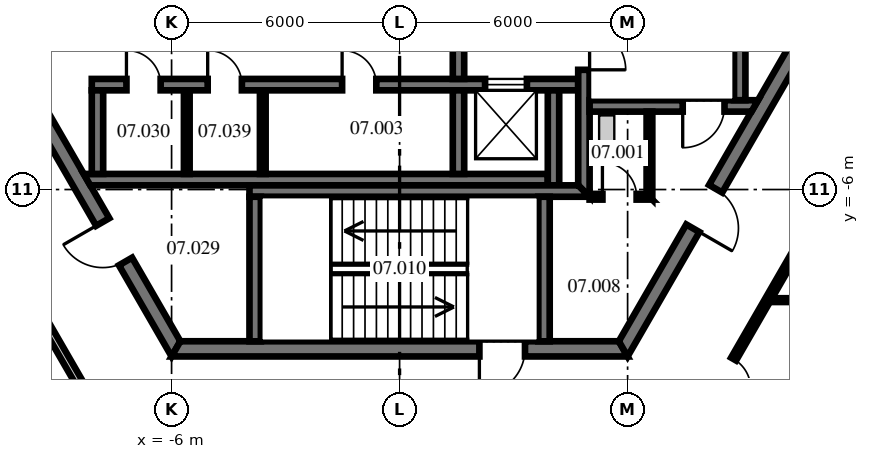
"""IFC4 building model, lengths in metres.
Left out: names, types, materials, properties, quantities, classifications, styles, units other than length and angle.
Written with IfcOpenShell. Run it as: python <this file> out.ifc"""

import sys

from ifc_helpers import new_model, si_unit, direction, frame, frame_2d, origin, place, context, subcontext, project, spatial, polyline, rectangle, outline, extrude, source, transform, mapped, element, fill, save


model = new_model("IFC4")
c1 = context("Model", 3, precision=1e-05, world=origin(), true_north=direction((0.0, 1.0)))
c2 = subcontext(c1, "Body", "Model", "MODEL_VIEW")
j1 = project(units=[si_unit("LENGTHUNIT", "METRE"), si_unit("PLANEANGLEUNIT", "RADIAN")], contexts=[c1])
p1 = place(None, origin())
s1 = spatial("IfcSite", under=j1, at=p1, CompositionType="ELEMENT")
p2 = place(p1, origin())
s2 = spatial("IfcBuilding", under=s1, at=p2, CompositionType="ELEMENT")
p3 = place(p2, frame((0.0, 0.0, 33.2)))
s3 = spatial("IfcBuildingStorey", under=s2, at=p3, CompositionType="ELEMENT", Elevation=33.2)
m1 = source(origin(), c2, "Body", "SweptSolid", [
    extrude(outline(polyline([(-0.115, -0.2), (11.885, -0.2), (11.654, 0.2), (0.115, 0.2), (-0.115, -0.2)])), origin(), (0.0, 0.0, 1.0), 4.1),
])
p4 = place(p3, frame((-11.769, 0.0, 0.0), z_axis=(0.0, 0.0, 1.0), x_axis=(0.499996592174, -0.866027371285, 0.0)))
e1 = element("IfcWall", 1, at=p4, inside=s3, PredefinedType="SHEAR", context=c2, shape_type="MappedRepresentation", body=[
    mapped(m1, transform((0.0, 0.0, 0.0), scale=1.0)),
])
p5 = place(p4, frame((1.405, 0.0, 0.0)))
e2 = element("IfcOpeningElement", 2, at=p5, cuts=e1, PredefinedType="OPENING", context=c2, shape_type="SweptSolid", body=[
    extrude(rectangle(XDim=1.8, YDim=2.1, at=frame_2d((0.9, 1.05))), frame((0.0, 0.21, 0.0), z_axis=(0.0, -1.0, 0.0), x_axis=(1.0, 0.0, 0.0)), (0.0, 0.0, 1.0), 0.42),
])
p6 = place(p4, frame((7.915, 0.0, 0.0)))
e3 = element("IfcOpeningElement", 3, at=p6, cuts=e1, PredefinedType="OPENING", context=c2, shape_type="SweptSolid", body=[
    extrude(rectangle(XDim=1.2, YDim=2.1, at=frame_2d((0.6, 1.05))), frame((0.0, 0.21, 0.0), z_axis=(0.0, -1.0, 0.0), x_axis=(1.0, 0.0, 0.0)), (0.0, 0.0, 1.0), 0.42),
])
p7 = place(p3, frame((-5.885, -10.192, 0.0), z_axis=(0.0, 0.0, 1.0), x_axis=(1.0, 0.0, 0.0)))
e4 = element("IfcWall", 4, at=p7, inside=s3, PredefinedType="SHEAR", context=c2, shape_type="MappedRepresentation", body=[
    mapped(m1, transform((0.0, 0.0, 0.0), scale=1.0)),
])
p8 = place(p7, frame((7.985, 0.0, 0.0)))
e5 = element("IfcOpeningElement", 5, at=p8, cuts=e4, PredefinedType="OPENING", context=c2, shape_type="SweptSolid", body=[
    extrude(rectangle(XDim=1.2, YDim=2.1, at=frame_2d((0.6, 1.05))), frame((0.0, 0.21, 0.0), z_axis=(0.0, -1.0, 0.0), x_axis=(1.0, 0.0, 0.0)), (0.0, 0.0, 1.0), 0.42),
])
p9 = place(p3, frame((5.885, -10.192, 0.0), z_axis=(0.0, 0.0, 1.0), x_axis=(0.499996592174, 0.866027371285, 0.0)))
e6 = element("IfcWall", 6, at=p9, inside=s3, PredefinedType="SHEAR", context=c2, shape_type="MappedRepresentation", body=[
    mapped(m1, transform((0.0, 0.0, 0.0), scale=1.0)),
])
p10 = place(p9, frame((3.665, 0.0, 0.0)))
e7 = element("IfcOpeningElement", 7, at=p10, cuts=e6, PredefinedType="OPENING", context=c2, shape_type="SweptSolid", body=[
    extrude(rectangle(XDim=1.2, YDim=2.1, at=frame_2d((0.6, 1.05))), frame((0.0, 0.21, 0.0), z_axis=(0.0, -1.0, 0.0), x_axis=(1.0, 0.0, 0.0)), (0.0, 0.0, 1.0), 0.42),
])
m2 = source(origin(), c2, "Body", "SweptSolid", [
    extrude(rectangle(XDim=12.8, YDim=0.3, at=frame_2d((6.4, 0.0))), origin(), (0.0, 0.0, 1.0), 4.1),
])
p11 = place(p3, frame((-8.1, -3.24, 0.0), z_axis=(0.0, 0.0, 1.0), x_axis=(1.0, 0.0, 0.0)))
e8 = element("IfcWall", 8, at=p11, inside=s3, PredefinedType="SHEAR", context=c2, shape_type="MappedRepresentation", body=[
    mapped(m2, transform((0.0, 0.0, 0.0), scale=1.0)),
])
p12 = place(p11, frame((0.913, 0.0, 0.0)))
e9 = element("IfcOpeningElement", 9, at=p12, cuts=e8, PredefinedType="OPENING", context=c2, shape_type="SweptSolid", body=[
    extrude(rectangle(XDim=0.9, YDim=2.1, at=frame_2d((0.45, 1.05))), frame((0.0, 0.16, 0.0), z_axis=(0.0, -1.0, 0.0), x_axis=(1.0, 0.0, 0.0)), (0.0, 0.0, 1.0), 0.32),
])
p13 = place(p11, frame((3.05, 0.0, 0.0)))
e10 = element("IfcOpeningElement", 10, at=p13, cuts=e8, PredefinedType="OPENING", context=c2, shape_type="SweptSolid", body=[
    extrude(rectangle(XDim=0.9, YDim=2.1, at=frame_2d((0.45, 1.05))), frame((0.0, 0.16, 0.0), z_axis=(0.0, -1.0, 0.0), x_axis=(1.0, 0.0, 0.0)), (0.0, 0.0, 1.0), 0.32),
])
p14 = place(p11, frame((6.587, 0.0, 0.0)))
e11 = element("IfcOpeningElement", 11, at=p14, cuts=e8, PredefinedType="OPENING", context=c2, shape_type="SweptSolid", body=[
    extrude(rectangle(XDim=0.9, YDim=2.1, at=frame_2d((0.45, 1.05))), frame((0.0, 0.16, 0.0), z_axis=(0.0, -1.0, 0.0), x_axis=(1.0, 0.0, 0.0)), (0.0, 0.0, 1.0), 0.32),
])
p15 = place(p11, frame((10.35, 0.0, 0.0)))
e12 = element("IfcOpeningElement", 12, at=p15, cuts=e8, PredefinedType="OPENING", context=c2, shape_type="SweptSolid", body=[
    extrude(rectangle(XDim=1.1, YDim=2.1, at=frame_2d((0.55, 1.05))), frame((0.0, 0.16, 0.0), z_axis=(0.0, -1.0, 0.0), x_axis=(1.0, 0.0, 0.0)), (0.0, 0.0, 1.0), 0.32),
])
m3 = source(origin(), c2, "Body", "SweptSolid", [
    extrude(outline(polyline([(12.0, -0.15), (-0.04, -0.15), (-0.213, 0.15), (12.0, 0.15), (12.0, -0.15)])), origin(), (0.0, 0.0, 1.0), 4.1),
])
p16 = place(p3, frame((-8.1, -5.74, 0.0), z_axis=(0.0, 0.0, 1.0), x_axis=(1.0, 0.0, 0.0)))
e13 = element("IfcWall", 13, at=p16, inside=s3, PredefinedType="SHEAR", context=c2, shape_type="MappedRepresentation", body=[
    mapped(m3, transform((0.0, 0.0, 0.0), scale=1.0)),
])
m4 = source(origin(), c2, "Body", "SweptSolid", [
    extrude(rectangle(XDim=2.2, YDim=0.3, at=frame_2d((1.1, 0.0))), origin(), (0.0, 0.0, 1.0), 4.1),
])
for number, where, z_axis, x_axis in (
    (14, (-7.95, -5.59, 0.0), (0.0, 0.0, 1.0), (0.0, 1.0, 0.0)),
    (15, (1.55, -5.59, 0.0), (0.0, 0.0, 1.0), (0.0, 1.0, 0.0)),
):
    element("IfcWall", number, at=place(p3, frame(where, z_axis=z_axis, x_axis=x_axis)), inside=s3, PredefinedType="SHEAR", context=c2, shape_type="MappedRepresentation", body=[
        mapped(m4, transform((0.0, 0.0, 0.0), scale=1.0)),
    ])
m5 = source(origin(), c2, "Body", "SweptSolid", [
    extrude(rectangle(XDim=2.5, YDim=0.3, at=frame_2d((1.25, 0.0))), origin(), (0.0, 0.0, 1.0), 4.1),
])
p17 = place(p3, frame((4.05, -5.89, 0.0), z_axis=(0.0, 0.0, 1.0), x_axis=(0.0, 1.0, 0.0)))
e16 = element("IfcWall", 16, at=p17, inside=s3, PredefinedType="SHEAR", context=c2, shape_type="MappedRepresentation", body=[
    mapped(m5, transform((0.0, 0.0, 0.0), scale=1.0)),
])
m6 = source(origin(), c2, "Body", "SweptSolid", [
    extrude(rectangle(XDim=3.0, YDim=0.3, at=frame_2d((1.5, 0.0))), origin(), (0.0, 0.0, 1.0), 4.1),
])
p18 = place(p3, frame((1.55, -3.09, 0.0), z_axis=(0.0, 0.0, 1.0), x_axis=(0.0, 1.0, 0.0)))
e17 = element("IfcWall", 17, at=p18, inside=s3, PredefinedType="SHEAR", context=c2, shape_type="MappedRepresentation", body=[
    mapped(m6, transform((0.0, 0.0, 0.0), scale=1.0)),
])
p19 = place(p18, frame((0.9, 0.0, 0.0)))
e18 = element("IfcOpeningElement", 18, at=p19, cuts=e17, PredefinedType="OPENING", context=c2, shape_type="SweptSolid", body=[
    extrude(rectangle(XDim=1.2, YDim=2.1, at=frame_2d((0.6, 1.05))), frame((0.0, 0.16, 0.0), z_axis=(0.0, -1.0, 0.0), x_axis=(1.0, 0.0, 0.0)), (0.0, 0.0, 1.0), 0.32),
])
m7 = source(origin(), c2, "Body", "SweptSolid", [
    extrude(outline(polyline([(-0.15, -0.15), (9.99, -0.15), (9.99, 0.15), (0.15, 0.15), (-0.15, -0.15)])), origin(), (0.0, 0.0, 1.0), 4.1),
])
p20 = place(p3, frame((4.85, -6.04, 0.0), z_axis=(0.0, 0.0, 1.0), x_axis=(0.0, 1.0, 0.0)))
e19 = element("IfcWall", 19, at=p20, inside=s3, PredefinedType="SHEAR", context=c2, shape_type="MappedRepresentation", body=[
    mapped(m7, transform((0.0, 0.0, 0.0), scale=1.0)),
])
p21 = place(p20, frame((3.19, 0.0, 0.0)))
e20 = element("IfcOpeningElement", 20, at=p21, cuts=e19, PredefinedType="OPENING", context=c2, shape_type="SweptSolid", body=[
    extrude(rectangle(XDim=1.1, YDim=2.1, at=frame_2d((0.55, 1.05))), frame((0.0, 0.16, 0.0), z_axis=(0.0, -1.0, 0.0), x_axis=(1.0, 0.0, 0.0)), (0.0, 0.0, 1.0), 0.32),
])
m8 = source(origin(), c2, "Body", "SweptSolid", [
    extrude(outline(polyline([(0.0, -0.15), (0.0, 0.15), (4.433, 0.15), (4.26, -0.15), (0.0, -0.15)])), origin(), (0.0, 0.0, 1.0), 4.1),
])
p22 = place(p3, frame((5.0, -3.8, 0.0), z_axis=(0.0, 0.0, 1.0), x_axis=(1.0, 0.0, 0.0)))
e21 = element("IfcWall", 21, at=p22, inside=s3, PredefinedType="SHEAR", context=c2, shape_type="MappedRepresentation", body=[
    mapped(m8, transform((0.0, 0.0, 0.0), scale=1.0)),
])
p23 = place(p22, frame((2.45, 0.0, 0.0)))
e22 = element("IfcOpeningElement", 22, at=p23, cuts=e21, PredefinedType="OPENING", context=c2, shape_type="SweptSolid", body=[
    extrude(rectangle(XDim=1.1, YDim=2.1, at=frame_2d((0.55, 1.05))), frame((0.0, 0.16, 0.0), z_axis=(0.0, -1.0, 0.0), x_axis=(1.0, 0.0, 0.0)), (0.0, 0.0, 1.0), 0.32),
])
m9 = source(origin(), c2, "Body", "SweptSolid", [
    extrude(rectangle(XDim=7.3, YDim=0.3, at=frame_2d((3.65, 0.0))), origin(), (0.0, 0.0, 1.0), 4.1),
])
p24 = place(p3, frame((8.95, -3.65, 0.0), z_axis=(0.0, 0.0, 1.0), x_axis=(0.0, 1.0, 0.0)))
e23 = element("IfcWall", 23, at=p24, inside=s3, PredefinedType="SHEAR", context=c2, shape_type="MappedRepresentation", body=[
    mapped(m9, transform((0.0, 0.0, 0.0), scale=1.0)),
])
m10 = source(origin(), c2, "Body", "SweptSolid", [
    extrude(outline(polyline([(0.0, -0.15), (8.95, -0.15), (8.65, 0.15), (0.0, 0.15), (0.0, -0.15)])), origin(), (0.0, 0.0, 1.0), 4.1),
])
p25 = place(p3, frame((-3.95, -6.04, 0.0), z_axis=(0.0, 0.0, 1.0), x_axis=(1.0, 0.0, 0.0)))
e24 = element("IfcWall", 24, at=p25, inside=s3, PredefinedType="SHEAR", context=c2, shape_type="MappedRepresentation", body=[
    mapped(m10, transform((0.0, 0.0, 0.0), scale=1.0)),
])
m11 = source(origin(), c2, "Body", "SweptSolid", [
    extrude(outline(polyline([(3.8, -0.15), (-0.004, -0.15), (-0.004, 0.15), (3.8, 0.15), (3.8, -0.15)])), origin(), (0.0, 0.0, 1.0), 4.1),
])
for number, where, z_axis, x_axis in (
    (25, (-3.8, -9.99, 0.0), (0.0, 0.0, 1.0), (0.0, 1.0, 0.0)),
    (26, (3.8, -9.99, 0.0), (0.0, 0.0, 1.0), (0.0, 1.0, 0.0)),
):
    element("IfcWall", number, at=place(p3, frame(where, z_axis=z_axis, x_axis=x_axis)), inside=s3, PredefinedType="SHEAR", context=c2, shape_type="MappedRepresentation", body=[
        mapped(m11, transform((0.0, 0.0, 0.0), scale=1.0)),
    ])
m12 = source(origin(), c2, "Body", "SweptSolid", [
    extrude(outline(polyline([(0.0, -0.075), (1.65, -0.075), (1.5, 0.075), (0.0, 0.075), (0.0, -0.075)])), origin(), (0.0, 0.0, 1.0), 4.1),
])
p26 = place(p3, frame((5.0, -6.19, 0.0), z_axis=(0.0, 0.0, 1.0), x_axis=(1.0, 0.0, 0.0)))
e27 = element("IfcWall", 27, at=p26, inside=s3, PredefinedType="PARTITIONING", context=c2, shape_type="MappedRepresentation", body=[
    mapped(m12, transform((0.0, 0.0, 0.0), scale=1.0)),
])
p27 = place(p26, frame((0.337, 0.0, 0.0)))
e28 = element("IfcOpeningElement", 28, at=p27, cuts=e27, PredefinedType="OPENING", context=c2, shape_type="SweptSolid", body=[
    extrude(rectangle(XDim=0.9, YDim=2.1, at=frame_2d((0.45, 1.05))), frame((0.0, 0.085, 0.0), z_axis=(0.0, -1.0, 0.0), x_axis=(1.0, 0.0, 0.0)), (0.0, 0.0, 1.0), 0.17),
])
m13 = source(origin(), c2, "Body", "SweptSolid", [
    extrude(outline(polyline([(-0.075, -0.075), (2.24, -0.075), (2.24, 0.075), (0.075, 0.075), (-0.075, -0.075)])), origin(), (0.0, 0.0, 1.0), 4.1),
])
p28 = place(p3, frame((6.575, -6.19, 0.0), z_axis=(0.0, 0.0, 1.0), x_axis=(0.0, 1.0, 0.0)))
e29 = element("IfcWall", 29, at=p28, inside=s3, PredefinedType="PARTITIONING", context=c2, shape_type="MappedRepresentation", body=[
    mapped(m13, transform((0.0, 0.0, 0.0), scale=1.0)),
])
m14 = source(origin(), c2, "Body", "SweptSolid", [
    extrude(rectangle(XDim=2.2, YDim=0.15, at=frame_2d((1.1, 0.0))), origin(), (0.0, 0.0, 1.0), 4.1),
])
for number, where, z_axis, x_axis in (
    (30, (-5.6, -5.59, 0.0), (0.0, 0.0, 1.0), (0.0, 1.0, 0.0)),
    (31, (-3.6, -5.59, 0.0), (0.0, 0.0, 1.0), (0.0, 1.0, 0.0)),
):
    element("IfcWall", number, at=place(p3, frame(where, z_axis=z_axis, x_axis=x_axis)), inside=s3, PredefinedType="PARTITIONING", context=c2, shape_type="MappedRepresentation", body=[
        mapped(m14, transform((0.0, 0.0, 0.0), scale=1.0)),
    ])
m15 = source(origin(), c2, "Body", "SweptSolid", [
    extrude(rectangle(XDim=8.478, YDim=0.2, at=frame_2d((4.239, 0.0))), origin(), (0.0, 0.0, 1.0), 4.1),
])
p29 = place(p3, frame((-11.673, -5.466, 0.0), z_axis=(0.0, 0.0, 1.0), x_axis=(0.499985860718, -0.866033566949, 0.0)))
e32 = element("IfcWall", 32, at=p29, inside=s3, PredefinedType="PARTITIONING", context=c2, shape_type="MappedRepresentation", body=[
    mapped(m15, transform((0.0, 0.0, 0.0), scale=1.0)),
])
m16 = source(origin(), c2, "Body", "SweptSolid", [
    extrude(rectangle(XDim=11.802, YDim=0.1, at=frame_2d((5.901, 0.0))), origin(), (0.0, 0.0, 1.0), 3.343),
])
p30 = place(p3, frame((9.685, -8.91, 0.0), z_axis=(0.0, 0.0, 1.0), x_axis=(1.0, 0.0, 0.0)))
e33 = element("IfcWall", 33, at=p30, inside=s3, PredefinedType="PARTITIONING", context=c2, shape_type="MappedRepresentation", body=[
    mapped(m16, transform((0.0, 0.0, 0.0), scale=1.0)),
])
m17 = source(origin(), c2, "Body", "SweptSolid", [
    extrude(rectangle(XDim=8.468, YDim=0.15, at=frame_2d((4.234, 0.0))), origin(), (0.0, 0.0, 1.0), 4.1),
])
p31 = place(p3, frame((7.449, -12.782, 0.0), z_axis=(0.0, 0.0, 1.0), x_axis=(0.499990325971, 0.866030989016, 0.0)))
e34 = element("IfcWall", 34, at=p31, inside=s3, PredefinedType="PARTITIONING", context=c2, shape_type="MappedRepresentation", body=[
    mapped(m17, transform((0.0, 0.0, 0.0), scale=1.0)),
])
p32 = place(p31, frame((1.78, 0.0, 0.0)))
e35 = element("IfcOpeningElement", 35, at=p32, cuts=e34, PredefinedType="OPENING", context=c2, shape_type="SweptSolid", body=[
    extrude(rectangle(XDim=0.9, YDim=2.1, at=frame_2d((0.45, 1.05))), frame((0.0, 0.085, 0.0), z_axis=(0.0, -1.0, 0.0), x_axis=(1.0, 0.0, 0.0)), (0.0, 0.0, 1.0), 0.17),
])
p33 = place(p8, frame((1.2, 0.0, 0.0), z_axis=(0.0, 0.0, 1.0), x_axis=(-1.0, 0.0, 0.0)))
e36 = element("IfcDoor", 36, at=p33, inside=s3, OperationType="SINGLE_SWING_RIGHT", PredefinedType="DOOR", context=c2, shape_type="SweptSolid", body=[
    extrude(rectangle(XDim=1.2, YDim=2.1, at=frame_2d((0.6, 1.05))), frame((0.0, 0.025, 0.0), z_axis=(0.0, -1.0, 0.0), x_axis=(1.0, 0.0, 0.0)), (0.0, 0.0, 1.0), 0.05),
])
fill(e5, e36)
p34 = place(p10, frame((1.2, 0.0, 0.0), z_axis=(0.0, 0.0, 1.0), x_axis=(-1.0, 0.0, 0.0)))
e37 = element("IfcDoor", 37, at=p34, inside=s3, OperationType="SINGLE_SWING_RIGHT", PredefinedType="DOOR", context=c2, shape_type="SweptSolid", body=[
    extrude(rectangle(XDim=1.2, YDim=2.1, at=frame_2d((0.6, 1.05))), frame((0.0, 0.025, 0.0), z_axis=(0.0, -1.0, 0.0), x_axis=(1.0, 0.0, 0.0)), (0.0, 0.0, 1.0), 0.05),
])
fill(e7, e37)
p35 = place(p6, frame((1.2, 0.0, 0.0), z_axis=(0.0, 0.0, 1.0), x_axis=(-1.0, 0.0, 0.0)))
e38 = element("IfcDoor", 38, at=p35, inside=s3, OperationType="SINGLE_SWING_RIGHT", PredefinedType="DOOR", context=c2, shape_type="SweptSolid", body=[
    extrude(rectangle(XDim=1.2, YDim=2.1, at=frame_2d((0.6, 1.05))), frame((0.0, 0.025, 0.0), z_axis=(0.0, -1.0, 0.0), x_axis=(1.0, 0.0, 0.0)), (0.0, 0.0, 1.0), 0.05),
])
fill(e3, e38)
p36 = place(p21, frame((1.1, 0.0, 0.0), z_axis=(0.0, 0.0, 1.0), x_axis=(-1.0, 0.0, 0.0)))
e39 = element("IfcDoor", 39, at=p36, inside=s3, OperationType="SINGLE_SWING_RIGHT", PredefinedType="DOOR", context=c2, shape_type="SweptSolid", body=[
    extrude(rectangle(XDim=1.1, YDim=2.1, at=frame_2d((0.55, 1.05))), frame((0.0, 0.025, 0.0), z_axis=(0.0, -1.0, 0.0), x_axis=(1.0, 0.0, 0.0)), (0.0, 0.0, 1.0), 0.05),
])
fill(e20, e39)
p37 = place(p23, frame((1.1, 0.0, 0.0), z_axis=(0.0, 0.0, 1.0), x_axis=(-1.0, 0.0, 0.0)))
e40 = element("IfcDoor", 40, at=p37, inside=s3, OperationType="SINGLE_SWING_RIGHT", PredefinedType="DOOR", context=c2, shape_type="SweptSolid", body=[
    extrude(rectangle(XDim=1.1, YDim=2.1, at=frame_2d((0.55, 1.05))), frame((0.0, 0.025, 0.0), z_axis=(0.0, -1.0, 0.0), x_axis=(1.0, 0.0, 0.0)), (0.0, 0.0, 1.0), 0.05),
])
fill(e22, e40)
p38 = place(p27, origin())
e41 = element("IfcDoor", 41, at=p38, inside=s3, OperationType="SINGLE_SWING_LEFT", PredefinedType="DOOR", context=c2, shape_type="SweptSolid", body=[
    extrude(rectangle(XDim=0.9, YDim=2.1, at=frame_2d((0.45, 1.05))), frame((0.0, 0.025, 0.0), z_axis=(0.0, -1.0, 0.0), x_axis=(1.0, 0.0, 0.0)), (0.0, 0.0, 1.0), 0.05),
])
fill(e28, e41)
p39 = place(p12, origin())
e42 = element("IfcDoor", 42, at=p39, inside=s3, OperationType="SINGLE_SWING_LEFT", PredefinedType="DOOR", context=c2, shape_type="SweptSolid", body=[
    extrude(rectangle(XDim=0.9, YDim=2.1, at=frame_2d((0.45, 1.05))), frame((0.0, 0.025, 0.0), z_axis=(0.0, -1.0, 0.0), x_axis=(1.0, 0.0, 0.0)), (0.0, 0.0, 1.0), 0.05),
])
fill(e9, e42)
p40 = place(p13, origin())
e43 = element("IfcDoor", 43, at=p40, inside=s3, OperationType="SINGLE_SWING_LEFT", PredefinedType="DOOR", context=c2, shape_type="SweptSolid", body=[
    extrude(rectangle(XDim=0.9, YDim=2.1, at=frame_2d((0.45, 1.05))), frame((0.0, 0.025, 0.0), z_axis=(0.0, -1.0, 0.0), x_axis=(1.0, 0.0, 0.0)), (0.0, 0.0, 1.0), 0.05),
])
fill(e10, e43)
p41 = place(p14, origin())
e44 = element("IfcDoor", 44, at=p41, inside=s3, OperationType="SINGLE_SWING_LEFT", PredefinedType="DOOR", context=c2, shape_type="SweptSolid", body=[
    extrude(rectangle(XDim=0.9, YDim=2.1, at=frame_2d((0.45, 1.05))), frame((0.0, 0.025, 0.0), z_axis=(0.0, -1.0, 0.0), x_axis=(1.0, 0.0, 0.0)), (0.0, 0.0, 1.0), 0.05),
])
fill(e11, e44)
p42 = place(p15, origin())
e45 = element("IfcDoor", 45, at=p42, inside=s3, OperationType="DOUBLE_DOOR_SLIDING", PredefinedType="DOOR", context=c2, shape_type="SweptSolid", body=[
    extrude(rectangle(XDim=1.1, YDim=2.1, at=frame_2d((0.55, 1.05))), frame((0.0, 0.025, 0.0), z_axis=(0.0, -1.0, 0.0), x_axis=(1.0, 0.0, 0.0)), (0.0, 0.0, 1.0), 0.05),
])
fill(e12, e45)
p43 = place(p32, origin())
e46 = element("IfcDoor", 46, at=p43, inside=s3, OperationType="SINGLE_SWING_RIGHT", PredefinedType="DOOR", context=c2, shape_type="SweptSolid", body=[
    extrude(rectangle(XDim=0.9, YDim=2.1, at=frame_2d((0.45, 1.05))), frame((0.0, 0.025, 0.0), z_axis=(0.0, -1.0, 0.0), x_axis=(1.0, 0.0, 0.0)), (0.0, 0.0, 1.0), 0.05),
])
fill(e35, e46)
save(model, sys.argv[1])
